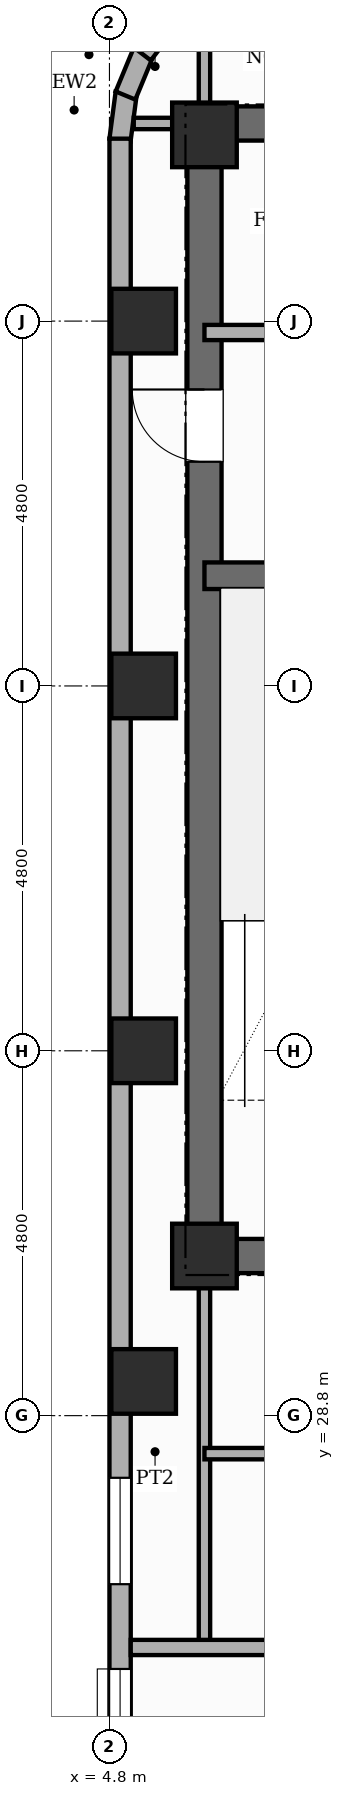
"""IFC4 building model, lengths in metres.
Left out: names, types, materials, properties, quantities, classifications, styles, units other than length and angle.
Written with IfcOpenShell. Run it as: python <this file> out.ifc"""

import sys

from ifc_helpers import new_model, si_unit, direction, frame, frame_2d, origin, origin_2d, place, context, subcontext, project, spatial, rectangle, extrude, element, fill, save


model = new_model("IFC4")
c1 = context("Model", 3, precision=1e-05, world=origin(), true_north=direction((0.0, 1.0)))
c2 = subcontext(c1, "Body", "Model", "MODEL_VIEW")
j1 = project(units=[si_unit("LENGTHUNIT", "METRE"), si_unit("PLANEANGLEUNIT", "RADIAN")], contexts=[c1])
p1 = place(None, origin())
s1 = spatial("IfcSite", under=j1, at=p1, CompositionType="ELEMENT")
p2 = place(p1, origin())
s2 = spatial("IfcBuilding", under=s1, at=p2, CompositionType="ELEMENT")
p3 = place(p2, frame((0.0, 0.0, 236.2)))
s3 = spatial("IfcBuildingStorey", under=s2, at=p3, CompositionType="ELEMENT", Elevation=236.2)
p4 = place(p3, frame((6.05, 30.675, 0.0), z_axis=(0.0, 0.0, 1.0), x_axis=(0.0, 1.0, 0.0)))
e1 = element("IfcWall", 1, at=p4, inside=s3, PredefinedType="SHEAR", context=c2, shape_type="SweptSolid", body=[
    extrude(rectangle(XDim=15.35, YDim=0.45, at=frame_2d((7.675, 0.0))), origin(), (0.0, 0.0, 1.0), 3.6),
])
p5 = place(p4, frame((10.675, 0.0, 0.0)))
e2 = element("IfcOpeningElement", 2, at=p5, cuts=e1, PredefinedType="OPENING", context=c2, shape_type="SweptSolid", body=[
    extrude(rectangle(XDim=0.95, YDim=2.15, at=frame_2d((0.475, 1.075))), frame((0.0, 0.235, 0.0), z_axis=(0.0, -1.0, 0.0), x_axis=(1.0, 0.0, 0.0)), (0.0, 0.0, 1.0), 0.47),
])
p6 = place(p3, frame((6.05, 45.8, 0.0), z_axis=(0.0, 0.0, 1.0), x_axis=(1.0, 0.0, 0.0)))
e3 = element("IfcWall", 3, at=p6, inside=s3, PredefinedType="SHEAR", context=c2, shape_type="SweptSolid", body=[
    extrude(rectangle(XDim=16.7, YDim=0.45, at=frame_2d((8.35, 0.0))), origin(), (0.0, 0.0, 1.0), 3.6),
])
p7 = place(p3, frame((6.05, 30.9, 0.0), z_axis=(0.0, 0.0, 1.0), x_axis=(1.0, 0.0, 0.0)))
e4 = element("IfcWall", 4, at=p7, inside=s3, PredefinedType="SHEAR", context=c2, shape_type="SweptSolid", body=[
    extrude(rectangle(XDim=3.91, YDim=0.45, at=frame_2d((1.955, 0.0))), origin(), (0.0, 0.0, 1.0), 3.6),
])
p8 = place(p3, frame((6.05, 39.85, 0.0), z_axis=(0.0, 0.0, 1.0), x_axis=(1.0, 0.0, 0.0)))
e5 = element("IfcWall", 5, at=p8, inside=s3, PredefinedType="SHEAR", context=c2, shape_type="SweptSolid", body=[
    extrude(rectangle(XDim=3.91, YDim=0.35, at=frame_2d((1.955, 0.0))), origin(), (0.0, 0.0, 1.0), 3.6),
])
for number, where, z_axis, x_axis in (
    (6, (5.25, 29.25, 0.0), (0.0, 0.0, 1.0), (1.0, 0.0, 0.0)),
    (7, (5.25, 33.6, 0.0), (0.0, 0.0, 1.0), (1.0, 0.0, 0.0)),
    (8, (5.25, 38.4, 0.0), (0.0, 0.0, 1.0), (1.0, 0.0, 0.0)),
    (9, (5.25, 43.2, 0.0), (0.0, 0.0, 1.0), (1.0, 0.0, 0.0)),
    (10, (6.05, 30.9, 0.0), (0.0, 0.0, 1.0), (1.0, 0.0, 0.0)),
    (11, (6.05, 45.65, 0.0), (0.0, 0.0, 1.0), (1.0, 0.0, 0.0)),
):
    element("IfcColumn", number, at=place(p3, frame(where, z_axis=z_axis, x_axis=x_axis)), inside=s3, PredefinedType="COLUMN", context=c2, shape_type="SweptSolid", body=[
        extrude(rectangle(XDim=0.85, YDim=0.85, at=origin_2d()), origin(), (0.0, 0.0, 1.0), 3.6),
    ])
for number, where, z_axis, x_axis in (
    (12, (4.939, 45.582, 0.0), (0.0, 0.0, 1.0), (0.131, 0.991, 0.0)),
    (13, (5.011, 46.167, 0.0), (0.0, 0.0, 1.0), (0.383, 0.924, 0.0)),
    (14, (5.233, 46.715, 0.0), (0.0, 0.0, 1.0), (0.609, 0.793, 0.0)),
):
    element("IfcWall", number, at=place(p3, frame(where, z_axis=z_axis, x_axis=x_axis)), inside=s3, PredefinedType="STANDARD", context=c2, shape_type="SweptSolid", body=[
        extrude(rectangle(XDim=0.626, YDim=0.28, at=frame_2d((0.313, 0.0))), origin(), (0.0, 0.0, 1.0), 3.32),
    ])
p9 = place(p3, frame((4.94, 12.0, 0.0), z_axis=(0.0, 0.0, 1.0), x_axis=(0.0, 1.0, 0.0)))
e15 = element("IfcWall", 15, at=p9, inside=s3, PredefinedType="STANDARD", context=c2, shape_type="SweptSolid", body=[
    extrude(rectangle(XDim=33.6, YDim=0.28, at=frame_2d((16.8, 0.0))), origin(), (0.0, 0.0, 1.0), 2.6),
])
p10 = place(p9, frame((4.5, 0.0, 0.0)))
e16 = element("IfcOpeningElement", 16, at=p10, cuts=e15, PredefinedType="OPENING", context=c2, shape_type="SweptSolid", body=[
    extrude(rectangle(XDim=1.1, YDim=2.15, at=frame_2d((0.55, 1.075))), frame((0.0, 0.15, 0.0), z_axis=(0.0, -1.0, 0.0), x_axis=(1.0, 0.0, 0.0)), (0.0, 0.0, 1.0), 0.3),
])
p11 = place(p9, frame((3.153, 0.0, 0.45)))
e17 = element("IfcOpeningElement", 17, at=p11, cuts=e15, PredefinedType="OPENING", context=c2, shape_type="SweptSolid", body=[
    extrude(rectangle(XDim=0.75, YDim=1.8, at=frame_2d((0.375, 0.9))), frame((0.0, 0.15, 0.0), z_axis=(0.0, -1.0, 0.0), x_axis=(1.0, 0.0, 0.0)), (0.0, 0.0, 1.0), 0.3),
])
p12 = place(p9, frame((7.915, 0.0, 0.45)))
e18 = element("IfcOpeningElement", 18, at=p12, cuts=e15, PredefinedType="OPENING", context=c2, shape_type="SweptSolid", body=[
    extrude(rectangle(XDim=0.95, YDim=1.8, at=frame_2d((0.475, 0.9))), frame((0.0, 0.15, 0.0), z_axis=(0.0, -1.0, 0.0), x_axis=(1.0, 0.0, 0.0)), (0.0, 0.0, 1.0), 0.3),
])
p13 = place(p9, frame((0.49, 0.0, 0.45)))
e19 = element("IfcOpeningElement", 19, at=p13, cuts=e15, PredefinedType="OPENING", context=c2, shape_type="SweptSolid", body=[
    extrude(rectangle(XDim=0.95, YDim=1.8, at=frame_2d((0.475, 0.9))), frame((0.0, 0.15, 0.0), z_axis=(0.0, -1.0, 0.0), x_axis=(1.0, 0.0, 0.0)), (0.0, 0.0, 1.0), 0.3),
])
p14 = place(p9, frame((9.537, 0.0, 0.65)))
e20 = element("IfcOpeningElement", 20, at=p14, cuts=e15, PredefinedType="OPENING", context=c2, shape_type="SweptSolid", body=[
    extrude(rectangle(XDim=1.4, YDim=1.1, at=frame_2d((0.7, 0.55))), frame((0.0, 0.15, 0.0), z_axis=(0.0, -1.0, 0.0), x_axis=(1.0, 0.0, 0.0)), (0.0, 0.0, 1.0), 0.3),
])
p15 = place(p9, frame((14.583, 0.0, 0.65)))
e21 = element("IfcOpeningElement", 21, at=p15, cuts=e15, PredefinedType="OPENING", context=c2, shape_type="SweptSolid", body=[
    extrude(rectangle(XDim=1.4, YDim=1.1, at=frame_2d((0.7, 0.55))), frame((0.0, 0.15, 0.0), z_axis=(0.0, -1.0, 0.0), x_axis=(1.0, 0.0, 0.0)), (0.0, 0.0, 1.0), 0.3),
])
p16 = place(p9, frame((12.718, 0.0, 0.45)))
e22 = element("IfcOpeningElement", 22, at=p16, cuts=e15, PredefinedType="OPENING", context=c2, shape_type="SweptSolid", body=[
    extrude(rectangle(XDim=0.75, YDim=1.8, at=frame_2d((0.375, 0.9))), frame((0.0, 0.15, 0.0), z_axis=(0.0, -1.0, 0.0), x_axis=(1.0, 0.0, 0.0)), (0.0, 0.0, 1.0), 0.3),
])
p17 = place(p3, frame((6.05, 43.05, 0.0), z_axis=(0.0, 0.0, 1.0), x_axis=(1.0, 0.0, 0.0)))
e23 = element("IfcWall", 23, at=p17, inside=s3, PredefinedType="POLYGONAL", context=c2, shape_type="SweptSolid", body=[
    extrude(rectangle(XDim=3.91, YDim=0.2, at=frame_2d((1.955, 0.0))), origin(), (0.0, 0.0, 1.0), 2.6),
])
p18 = place(p17, frame((1.35, 0.0, 0.0)))
e24 = element("IfcOpeningElement", 24, at=p18, cuts=e23, PredefinedType="OPENING", context=c2, shape_type="SweptSolid", body=[
    extrude(rectangle(XDim=0.88, YDim=2.1, at=frame_2d((0.44, 1.05))), frame((0.0, 0.11, 0.0), z_axis=(0.0, -1.0, 0.0), x_axis=(1.0, 0.0, 0.0)), (0.0, 0.0, 1.0), 0.22),
])
p19 = place(p3, frame((6.05, 25.75, 0.0), z_axis=(0.0, 0.0, 1.0), x_axis=(0.0, 1.0, 0.0)))
e25 = element("IfcWall", 25, at=p19, inside=s3, PredefinedType="PARTITIONING", context=c2, shape_type="SweptSolid", body=[
    extrude(rectangle(XDim=5.15, YDim=0.15, at=frame_2d((2.575, 0.0))), origin(), (0.0, 0.0, 1.0), 3.32),
])
p20 = place(p3, frame((6.05, 28.3, 0.0), z_axis=(0.0, 0.0, 1.0), x_axis=(1.0, 0.0, 0.0)))
e26 = element("IfcWall", 26, at=p20, inside=s3, PredefinedType="PARTITIONING", context=c2, shape_type="SweptSolid", body=[
    extrude(rectangle(XDim=7.55, YDim=0.15, at=frame_2d((3.775, 0.0))), origin(), (0.0, 0.0, 1.0), 3.32),
])
p21 = place(p3, frame((5.08, 25.75, 0.0), z_axis=(0.0, 0.0, 1.0), x_axis=(1.0, 0.0, 0.0)))
e27 = element("IfcWall", 27, at=p21, inside=s3, PredefinedType="PARTITIONING", context=c2, shape_type="SweptSolid", body=[
    extrude(rectangle(XDim=8.52, YDim=0.2, at=frame_2d((4.26, 0.0))), origin(), (0.0, 0.0, 1.0), 3.32),
])
p22 = place(p3, frame((5.12, 45.8, 0.0), z_axis=(0.0, 0.0, 1.0), x_axis=(1.0, 0.0, 0.0)))
e28 = element("IfcWall", 28, at=p22, inside=s3, PredefinedType="PARTITIONING", context=c2, shape_type="SweptSolid", body=[
    extrude(rectangle(XDim=0.93, YDim=0.15, at=frame_2d((0.465, 0.0))), origin(), (0.0, 0.0, 1.0), 3.32),
])
p23 = place(p3, frame((6.05, 45.8, 0.0), z_axis=(0.0, 0.0, 1.0), x_axis=(0.0, 1.0, 0.0)))
e29 = element("IfcWall", 29, at=p23, inside=s3, PredefinedType="PARTITIONING", context=c2, shape_type="SweptSolid", body=[
    extrude(rectangle(XDim=1.5, YDim=0.15, at=frame_2d((0.75, 0.0))), origin(), (0.0, 0.0, 1.0), 3.32),
])
p24 = place(p15, origin())
e30 = element("IfcWindow", 30, at=p24, inside=s3, PartitioningType="SINGLE_PANEL", PredefinedType="WINDOW", context=c2, shape_type="SweptSolid", body=[
    extrude(rectangle(XDim=1.4, YDim=1.1, at=frame_2d((0.7, 0.55))), frame((0.0, 0.03, 0.0), z_axis=(0.0, -1.0, 0.0), x_axis=(1.0, 0.0, 0.0)), (0.0, 0.0, 1.0), 0.06),
])
fill(e21, e30)
p25 = place(p16, origin())
e31 = element("IfcWindow", 31, at=p25, inside=s3, PartitioningType="SINGLE_PANEL", PredefinedType="WINDOW", context=c2, shape_type="SweptSolid", body=[
    extrude(rectangle(XDim=0.75, YDim=1.8, at=frame_2d((0.375, 0.9))), frame((0.0, 0.03, 0.0), z_axis=(0.0, -1.0, 0.0), x_axis=(1.0, 0.0, 0.0)), (0.0, 0.0, 1.0), 0.06),
])
fill(e22, e31)
p26 = place(p5, origin())
e32 = element("IfcDoor", 32, at=p26, inside=s3, OperationType="SINGLE_SWING_RIGHT", PredefinedType="DOOR", context=c2, shape_type="SweptSolid", body=[
    extrude(rectangle(XDim=0.95, YDim=2.15, at=frame_2d((0.475, 1.075))), frame((0.0, 0.025, 0.0), z_axis=(0.0, -1.0, 0.0), x_axis=(1.0, 0.0, 0.0)), (0.0, 0.0, 1.0), 0.05),
])
fill(e2, e32)
save(model, sys.argv[1])
